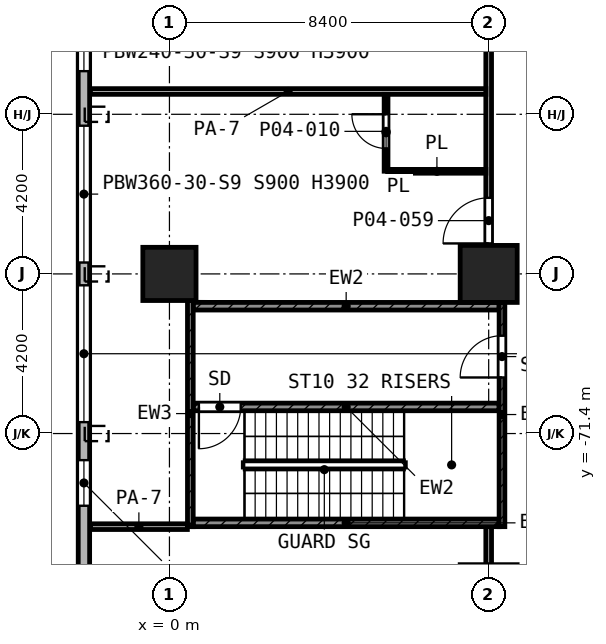
"""IFC4 building model, lengths in metres.
Left out: names, types, materials, properties, quantities, classifications, styles, units other than length and angle.
Written with IfcOpenShell. Run it as: python <this file> out.ifc"""

import sys

from ifc_helpers import new_model, si_unit, direction, frame, frame_2d, origin, origin_2d, place, context, subcontext, project, spatial, rectangle, extrude, element, fill, save


model = new_model("IFC4")
c1 = context("Model", 3, precision=1e-05, world=origin(), true_north=direction((0.0, 1.0)))
c2 = subcontext(c1, "Body", "Model", "MODEL_VIEW")
j1 = project(units=[si_unit("LENGTHUNIT", "METRE"), si_unit("PLANEANGLEUNIT", "RADIAN")], contexts=[c1])
p1 = place(None, origin())
s1 = spatial("IfcSite", under=j1, at=p1, CompositionType="ELEMENT")
p2 = place(p1, origin())
s2 = spatial("IfcBuilding", under=s1, at=p2, CompositionType="ELEMENT")
p3 = place(p2, frame((0.0, 0.0, 18.2)))
s3 = spatial("IfcBuildingStorey", under=s2, at=p3, CompositionType="ELEMENT", Elevation=18.2)
p4 = place(p3, frame((0.0, -67.2, 0.0), z_axis=(0.0, 0.0, 1.0), x_axis=(1.0, 0.0, 0.0)))
e1 = element("IfcColumn", 1, at=p4, inside=s3, PredefinedType="COLUMN", context=c2, shape_type="SweptSolid", body=[
    extrude(rectangle(XDim=1.4, YDim=1.4, at=origin_2d()), origin(), (0.0, 0.0, 1.0), 5.6),
])
p5 = place(p3, frame((8.4, -67.2, 0.0), z_axis=(0.0, 0.0, 1.0), x_axis=(1.0, 0.0, 0.0)))
e2 = element("IfcColumn", 2, at=p5, inside=s3, PredefinedType="COLUMN", context=c2, shape_type="SweptSolid", body=[
    extrude(rectangle(XDim=1.5, YDim=1.5, at=origin_2d()), origin(), (0.0, 0.0, 1.0), 5.6),
])
p6 = place(p3, frame((-2.25, -3.662, 0.0), z_axis=(0.0, 0.0, 1.0), x_axis=(0.0, -1.0, 0.0)))
e3 = element("IfcWall", 3, at=p6, inside=s3, PredefinedType="SOLIDWALL", context=c2, shape_type="SweptSolid", body=[
    extrude(rectangle(XDim=76.676, YDim=0.3, at=frame_2d((38.338, 0.0))), origin(), (0.0, 0.0, 1.0), 5.05),
])
p7 = place(p6, frame((0.838, 0.0, 0.9)))
e4 = element("IfcOpeningElement", 4, at=p7, cuts=e3, PredefinedType="OPENING", context=c2, shape_type="SweptSolid", body=[
    extrude(rectangle(XDim=3.6, YDim=3.0, at=frame_2d((1.8, 1.5))), frame((0.0, 0.16, 0.0), z_axis=(0.0, -1.0, 0.0), x_axis=(1.0, 0.0, 0.0)), (0.0, 0.0, 1.0), 0.32),
])
p8 = place(p6, frame((5.038, 0.0, 0.9)))
e5 = element("IfcOpeningElement", 5, at=p8, cuts=e3, PredefinedType="OPENING", context=c2, shape_type="SweptSolid", body=[
    extrude(rectangle(XDim=3.6, YDim=3.0, at=frame_2d((1.8, 1.5))), frame((0.0, 0.16, 0.0), z_axis=(0.0, -1.0, 0.0), x_axis=(1.0, 0.0, 0.0)), (0.0, 0.0, 1.0), 0.32),
])
p9 = place(p6, frame((9.238, 0.0, 0.9)))
e6 = element("IfcOpeningElement", 6, at=p9, cuts=e3, PredefinedType="OPENING", context=c2, shape_type="SweptSolid", body=[
    extrude(rectangle(XDim=3.6, YDim=3.0, at=frame_2d((1.8, 1.5))), frame((0.0, 0.16, 0.0), z_axis=(0.0, -1.0, 0.0), x_axis=(1.0, 0.0, 0.0)), (0.0, 0.0, 1.0), 0.32),
])
p10 = place(p6, frame((13.438, 0.0, 0.9)))
e7 = element("IfcOpeningElement", 7, at=p10, cuts=e3, PredefinedType="OPENING", context=c2, shape_type="SweptSolid", body=[
    extrude(rectangle(XDim=3.6, YDim=3.0, at=frame_2d((1.8, 1.5))), frame((0.0, 0.16, 0.0), z_axis=(0.0, -1.0, 0.0), x_axis=(1.0, 0.0, 0.0)), (0.0, 0.0, 1.0), 0.32),
])
p11 = place(p6, frame((17.638, 0.0, 0.9)))
e8 = element("IfcOpeningElement", 8, at=p11, cuts=e3, PredefinedType="OPENING", context=c2, shape_type="SweptSolid", body=[
    extrude(rectangle(XDim=3.6, YDim=3.0, at=frame_2d((1.8, 1.5))), frame((0.0, 0.16, 0.0), z_axis=(0.0, -1.0, 0.0), x_axis=(1.0, 0.0, 0.0)), (0.0, 0.0, 1.0), 0.32),
])
p12 = place(p6, frame((21.838, 0.0, 0.9)))
e9 = element("IfcOpeningElement", 9, at=p12, cuts=e3, PredefinedType="OPENING", context=c2, shape_type="SweptSolid", body=[
    extrude(rectangle(XDim=3.6, YDim=3.0, at=frame_2d((1.8, 1.5))), frame((0.0, 0.16, 0.0), z_axis=(0.0, -1.0, 0.0), x_axis=(1.0, 0.0, 0.0)), (0.0, 0.0, 1.0), 0.32),
])
p13 = place(p6, frame((26.038, 0.0, 0.9)))
e10 = element("IfcOpeningElement", 10, at=p13, cuts=e3, PredefinedType="OPENING", context=c2, shape_type="SweptSolid", body=[
    extrude(rectangle(XDim=3.6, YDim=3.0, at=frame_2d((1.8, 1.5))), frame((0.0, 0.16, 0.0), z_axis=(0.0, -1.0, 0.0), x_axis=(1.0, 0.0, 0.0)), (0.0, 0.0, 1.0), 0.32),
])
p14 = place(p6, frame((30.238, 0.0, 0.9)))
e11 = element("IfcOpeningElement", 11, at=p14, cuts=e3, PredefinedType="OPENING", context=c2, shape_type="SweptSolid", body=[
    extrude(rectangle(XDim=3.6, YDim=3.0, at=frame_2d((1.8, 1.5))), frame((0.0, 0.16, 0.0), z_axis=(0.0, -1.0, 0.0), x_axis=(1.0, 0.0, 0.0)), (0.0, 0.0, 1.0), 0.32),
])
p15 = place(p6, frame((34.438, 0.0, 0.9)))
e12 = element("IfcOpeningElement", 12, at=p15, cuts=e3, PredefinedType="OPENING", context=c2, shape_type="SweptSolid", body=[
    extrude(rectangle(XDim=3.6, YDim=3.0, at=frame_2d((1.8, 1.5))), frame((0.0, 0.16, 0.0), z_axis=(0.0, -1.0, 0.0), x_axis=(1.0, 0.0, 0.0)), (0.0, 0.0, 1.0), 0.32),
])
p16 = place(p6, frame((39.288, 0.0, 0.9)))
e13 = element("IfcOpeningElement", 13, at=p16, cuts=e3, PredefinedType="OPENING", context=c2, shape_type="SweptSolid", body=[
    extrude(rectangle(XDim=2.4, YDim=3.0, at=frame_2d((1.2, 1.5))), frame((0.0, 0.16, 0.0), z_axis=(0.0, -1.0, 0.0), x_axis=(1.0, 0.0, 0.0)), (0.0, 0.0, 1.0), 0.32),
])
p17 = place(p6, frame((42.838, 0.0, 0.9)))
e14 = element("IfcOpeningElement", 14, at=p17, cuts=e3, PredefinedType="OPENING", context=c2, shape_type="SweptSolid", body=[
    extrude(rectangle(XDim=3.6, YDim=3.0, at=frame_2d((1.8, 1.5))), frame((0.0, 0.16, 0.0), z_axis=(0.0, -1.0, 0.0), x_axis=(1.0, 0.0, 0.0)), (0.0, 0.0, 1.0), 0.32),
])
p18 = place(p6, frame((47.038, 0.0, 0.9)))
e15 = element("IfcOpeningElement", 15, at=p18, cuts=e3, PredefinedType="OPENING", context=c2, shape_type="SweptSolid", body=[
    extrude(rectangle(XDim=3.6, YDim=3.0, at=frame_2d((1.8, 1.5))), frame((0.0, 0.16, 0.0), z_axis=(0.0, -1.0, 0.0), x_axis=(1.0, 0.0, 0.0)), (0.0, 0.0, 1.0), 0.32),
])
p19 = place(p6, frame((51.238, 0.0, 0.9)))
e16 = element("IfcOpeningElement", 16, at=p19, cuts=e3, PredefinedType="OPENING", context=c2, shape_type="SweptSolid", body=[
    extrude(rectangle(XDim=3.6, YDim=3.0, at=frame_2d((1.8, 1.5))), frame((0.0, 0.16, 0.0), z_axis=(0.0, -1.0, 0.0), x_axis=(1.0, 0.0, 0.0)), (0.0, 0.0, 1.0), 0.32),
])
p20 = place(p6, frame((55.803, 0.0, 0.9)))
e17 = element("IfcOpeningElement", 17, at=p20, cuts=e3, PredefinedType="OPENING", context=c2, shape_type="SweptSolid", body=[
    extrude(rectangle(XDim=2.4, YDim=3.0, at=frame_2d((1.2, 1.5))), frame((0.0, 0.16, 0.0), z_axis=(0.0, -1.0, 0.0), x_axis=(1.0, 0.0, 0.0)), (0.0, 0.0, 1.0), 0.32),
])
p21 = place(p6, frame((59.638, 0.0, 0.9)))
e18 = element("IfcOpeningElement", 18, at=p21, cuts=e3, PredefinedType="OPENING", context=c2, shape_type="SweptSolid", body=[
    extrude(rectangle(XDim=3.6, YDim=3.0, at=frame_2d((1.8, 1.5))), frame((0.0, 0.16, 0.0), z_axis=(0.0, -1.0, 0.0), x_axis=(1.0, 0.0, 0.0)), (0.0, 0.0, 1.0), 0.32),
])
p22 = place(p6, frame((63.838, 0.0, 0.9)))
e19 = element("IfcOpeningElement", 19, at=p22, cuts=e3, PredefinedType="OPENING", context=c2, shape_type="SweptSolid", body=[
    extrude(rectangle(XDim=3.6, YDim=3.0, at=frame_2d((1.8, 1.5))), frame((0.0, 0.16, 0.0), z_axis=(0.0, -1.0, 0.0), x_axis=(1.0, 0.0, 0.0)), (0.0, 0.0, 1.0), 0.32),
])
p23 = place(p6, frame((68.438, 0.0, 0.9)))
e20 = element("IfcOpeningElement", 20, at=p23, cuts=e3, PredefinedType="OPENING", context=c2, shape_type="SweptSolid", body=[
    extrude(rectangle(XDim=1.2, YDim=3.0, at=frame_2d((0.6, 1.5))), frame((0.0, 0.16, 0.0), z_axis=(0.0, -1.0, 0.0), x_axis=(1.0, 0.0, 0.0)), (0.0, 0.0, 1.0), 0.32),
])
p24 = place(p6, frame((72.238, 0.0, 0.9)))
e21 = element("IfcOpeningElement", 21, at=p24, cuts=e3, PredefinedType="OPENING", context=c2, shape_type="SweptSolid", body=[
    extrude(rectangle(XDim=3.6, YDim=3.0, at=frame_2d((1.8, 1.5))), frame((0.0, 0.16, 0.0), z_axis=(0.0, -1.0, 0.0), x_axis=(1.0, 0.0, 0.0)), (0.0, 0.0, 1.0), 0.32),
])
p25 = place(p3, frame((0.55, -73.85, 0.0), z_axis=(0.0, 0.0, 1.0), x_axis=(0.0, 1.0, 0.0)))
e22 = element("IfcWall", 22, at=p25, inside=s3, PredefinedType="SHEAR", context=c2, shape_type="SweptSolid", body=[
    extrude(rectangle(XDim=5.95, YDim=0.15, at=frame_2d((2.975, 0.0))), origin(), (0.0, 0.0, 1.0), 5.05),
])
p26 = place(p3, frame((8.75, -73.85, 0.0), z_axis=(0.0, 0.0, 1.0), x_axis=(0.0, 1.0, 0.0)))
e23 = element("IfcWall", 23, at=p26, inside=s3, PredefinedType="SHEAR", context=c2, shape_type="SweptSolid", body=[
    extrude(rectangle(XDim=5.9, YDim=0.15, at=frame_2d((2.95, 0.0))), origin(), (0.0, 0.0, 1.0), 5.05),
])
p27 = place(p26, frame((3.925, 0.0, 0.0)))
e24 = element("IfcOpeningElement", 24, at=p27, cuts=e23, PredefinedType="OPENING", context=c2, shape_type="SweptSolid", body=[
    extrude(rectangle(XDim=1.1, YDim=2.1, at=frame_2d((0.55, 1.05))), frame((0.0, 0.085, 0.0), z_axis=(0.0, -1.0, 0.0), x_axis=(1.0, 0.0, 0.0)), (0.0, 0.0, 1.0), 0.17),
])
p28 = place(p3, frame((0.625, -73.75, 0.0), z_axis=(0.0, 0.0, 1.0), x_axis=(1.0, 0.0, 0.0)))
e25 = element("IfcWall", 25, at=p28, inside=s3, PredefinedType="SHEAR", context=c2, shape_type="SweptSolid", body=[
    extrude(rectangle(XDim=8.05, YDim=0.2, at=frame_2d((4.025, 0.0))), origin(), (0.0, 0.0, 1.0), 5.05),
])
p29 = place(p3, frame((0.625, -70.7, 0.0), z_axis=(0.0, 0.0, 1.0), x_axis=(1.0, 0.0, 0.0)))
e26 = element("IfcWall", 26, at=p29, inside=s3, PredefinedType="SHEAR", context=c2, shape_type="SweptSolid", body=[
    extrude(rectangle(XDim=8.05, YDim=0.2, at=frame_2d((4.025, 0.0))), origin(), (0.0, 0.0, 1.0), 5.05),
])
p30 = place(p29, frame((0.15, 0.0, 0.0)))
e27 = element("IfcOpeningElement", 27, at=p30, cuts=e26, PredefinedType="OPENING", context=c2, shape_type="SweptSolid", body=[
    extrude(rectangle(XDim=1.1, YDim=2.1, at=frame_2d((0.55, 1.05))), frame((0.0, 0.11, 0.0), z_axis=(0.0, -1.0, 0.0), x_axis=(1.0, 0.0, 0.0)), (0.0, 0.0, 1.0), 0.22),
])
p31 = place(p3, frame((0.625, -68.05, 0.0), z_axis=(0.0, 0.0, 1.0), x_axis=(1.0, 0.0, 0.0)))
e28 = element("IfcWall", 28, at=p31, inside=s3, PredefinedType="SHEAR", context=c2, shape_type="SweptSolid", body=[
    extrude(rectangle(XDim=8.05, YDim=0.2, at=frame_2d((4.025, 0.0))), origin(), (0.0, 0.0, 1.0), 5.05),
])
p32 = place(p3, frame((5.751, -64.5, 0.0), z_axis=(0.0, 0.0, 1.0), x_axis=(1.0, 0.0, 0.0)))
e29 = element("IfcWall", 29, at=p32, inside=s3, PredefinedType="PARTITIONING", context=c2, shape_type="SweptSolid", body=[
    extrude(rectangle(XDim=2.574, YDim=0.1, at=frame_2d((1.287, 0.0))), origin(), (0.0, 0.0, 1.0), 5.05),
])
p33 = place(p3, frame((5.7, -64.498, 0.0), z_axis=(0.0, 0.0, 1.0), x_axis=(0.0, 1.0, 0.0)))
e30 = element("IfcWall", 30, at=p33, inside=s3, PredefinedType="PARTITIONING", context=c2, shape_type="SweptSolid", body=[
    extrude(rectangle(XDim=2.023, YDim=0.1, at=frame_2d((1.011, 0.0))), origin(), (0.0, 0.0, 1.0), 5.05),
])
p34 = place(p33, frame((0.599, 0.0, 0.0)))
e31 = element("IfcOpeningElement", 31, at=p34, cuts=e30, PredefinedType="OPENING", context=c2, shape_type="SweptSolid", body=[
    extrude(rectangle(XDim=0.9, YDim=2.1, at=frame_2d((0.45, 1.05))), frame((0.0, 0.06, 0.0), z_axis=(0.0, -1.0, 0.0), x_axis=(1.0, 0.0, 0.0)), (0.0, 0.0, 1.0), 0.12),
])
p35 = place(p3, frame((-2.08, -73.85, 0.0), z_axis=(0.0, 0.0, 1.0), x_axis=(1.0, 0.0, 0.0)))
e32 = element("IfcWall", 32, at=p35, inside=s3, PredefinedType="PARTITIONING", context=c2, shape_type="SweptSolid", body=[
    extrude(rectangle(XDim=2.552, YDim=0.15, at=frame_2d((1.276, 0.0))), origin(), (0.0, 0.0, 1.0), 3.65),
])
p36 = place(p3, frame((-2.08, -62.4, 0.0), z_axis=(0.0, 0.0, 1.0), x_axis=(1.0, 0.0, 0.0)))
e33 = element("IfcWall", 33, at=p36, inside=s3, PredefinedType="PARTITIONING", context=c2, shape_type="SweptSolid", body=[
    extrude(rectangle(XDim=10.405, YDim=0.15, at=frame_2d((5.203, 0.0))), origin(), (0.0, 0.0, 1.0), 3.65),
])
p37 = place(p3, frame((8.4, -86.08, 0.0), z_axis=(0.0, 0.0, 1.0), x_axis=(0.0, 1.0, 0.0)))
e34 = element("IfcWall", 34, at=p37, inside=s3, PredefinedType="PARTITIONING", context=c2, shape_type="SweptSolid", body=[
    extrude(rectangle(XDim=12.23, YDim=0.15, at=frame_2d((6.115, 0.0))), origin(), (0.0, 0.0, 1.0), 3.65),
])
p38 = place(p37, frame((1.08, 0.0, 0.0)))
e35 = element("IfcOpeningElement", 35, at=p38, cuts=e34, PredefinedType="OPENING", context=c2, shape_type="SweptSolid", body=[
    extrude(rectangle(XDim=1.2, YDim=2.1, at=frame_2d((0.6, 1.05))), frame((0.0, 0.085, 0.0), z_axis=(0.0, -1.0, 0.0), x_axis=(1.0, 0.0, 0.0)), (0.0, 0.0, 1.0), 0.17),
])
p39 = place(p37, frame((3.08, 0.0, 0.0)))
e36 = element("IfcOpeningElement", 36, at=p39, cuts=e34, PredefinedType="OPENING", context=c2, shape_type="SweptSolid", body=[
    extrude(rectangle(XDim=1.2, YDim=2.1, at=frame_2d((0.6, 1.05))), frame((0.0, 0.085, 0.0), z_axis=(0.0, -1.0, 0.0), x_axis=(1.0, 0.0, 0.0)), (0.0, 0.0, 1.0), 0.17),
])
p40 = place(p3, frame((8.4, -67.947, 0.0), z_axis=(0.0, 0.0, 1.0), x_axis=(0.0, 1.0, 0.0)))
e37 = element("IfcWall", 37, at=p40, inside=s3, PredefinedType="PARTITIONING", context=c2, shape_type="SweptSolid", body=[
    extrude(rectangle(XDim=25.597, YDim=0.15, at=frame_2d((12.798, 0.0))), origin(), (0.0, 0.0, 1.0), 5.05),
])
p41 = place(p40, frame((18.347, 0.0, 0.0)))
e38 = element("IfcOpeningElement", 38, at=p41, cuts=e37, PredefinedType="OPENING", context=c2, shape_type="SweptSolid", body=[
    extrude(rectangle(XDim=1.2, YDim=2.1, at=frame_2d((0.6, 1.05))), frame((0.0, 0.085, 0.0), z_axis=(0.0, -1.0, 0.0), x_axis=(1.0, 0.0, 0.0)), (0.0, 0.0, 1.0), 0.17),
])
p42 = place(p40, frame((7.147, 0.0, 0.0)))
e39 = element("IfcOpeningElement", 39, at=p42, cuts=e37, PredefinedType="OPENING", context=c2, shape_type="SweptSolid", body=[
    extrude(rectangle(XDim=1.2, YDim=2.1, at=frame_2d((0.6, 1.05))), frame((0.0, 0.085, 0.0), z_axis=(0.0, -1.0, 0.0), x_axis=(1.0, 0.0, 0.0)), (0.0, 0.0, 1.0), 0.17),
])
p43 = place(p40, frame((9.947, 0.0, 0.0)))
e40 = element("IfcOpeningElement", 40, at=p43, cuts=e37, PredefinedType="OPENING", context=c2, shape_type="SweptSolid", body=[
    extrude(rectangle(XDim=1.2, YDim=2.1, at=frame_2d((0.6, 1.05))), frame((0.0, 0.085, 0.0), z_axis=(0.0, -1.0, 0.0), x_axis=(1.0, 0.0, 0.0)), (0.0, 0.0, 1.0), 0.17),
])
p44 = place(p40, frame((1.549, 0.0, 0.0)))
e41 = element("IfcOpeningElement", 41, at=p44, cuts=e37, PredefinedType="OPENING", context=c2, shape_type="SweptSolid", body=[
    extrude(rectangle(XDim=1.2, YDim=2.1, at=frame_2d((0.6, 1.05))), frame((0.0, 0.085, 0.0), z_axis=(0.0, -1.0, 0.0), x_axis=(1.0, 0.0, 0.0)), (0.0, 0.0, 1.0), 0.17),
])
p45 = place(p20, origin())
e42 = element("IfcWindow", 42, at=p45, inside=s3, PartitioningType="SINGLE_PANEL", PredefinedType="WINDOW", context=c2, shape_type="SweptSolid", body=[
    extrude(rectangle(XDim=2.4, YDim=3.0, at=frame_2d((1.2, 1.5))), frame((0.0, 0.03, 0.0), z_axis=(0.0, -1.0, 0.0), x_axis=(1.0, 0.0, 0.0)), (0.0, 0.0, 1.0), 0.06),
])
fill(e17, e42)
p46 = place(p21, origin())
e43 = element("IfcWindow", 43, at=p46, inside=s3, PartitioningType="SINGLE_PANEL", PredefinedType="WINDOW", context=c2, shape_type="SweptSolid", body=[
    extrude(rectangle(XDim=3.6, YDim=3.0, at=frame_2d((1.8, 1.5))), frame((0.0, 0.03, 0.0), z_axis=(0.0, -1.0, 0.0), x_axis=(1.0, 0.0, 0.0)), (0.0, 0.0, 1.0), 0.06),
])
fill(e18, e43)
p47 = place(p22, origin())
e44 = element("IfcWindow", 44, at=p47, inside=s3, PartitioningType="SINGLE_PANEL", PredefinedType="WINDOW", context=c2, shape_type="SweptSolid", body=[
    extrude(rectangle(XDim=3.6, YDim=3.0, at=frame_2d((1.8, 1.5))), frame((0.0, 0.03, 0.0), z_axis=(0.0, -1.0, 0.0), x_axis=(1.0, 0.0, 0.0)), (0.0, 0.0, 1.0), 0.06),
])
fill(e19, e44)
p48 = place(p23, origin())
e45 = element("IfcWindow", 45, at=p48, inside=s3, PartitioningType="SINGLE_PANEL", PredefinedType="WINDOW", context=c2, shape_type="SweptSolid", body=[
    extrude(rectangle(XDim=1.2, YDim=3.0, at=frame_2d((0.6, 1.5))), frame((0.0, 0.03, 0.0), z_axis=(0.0, -1.0, 0.0), x_axis=(1.0, 0.0, 0.0)), (0.0, 0.0, 1.0), 0.06),
])
fill(e20, e45)
p49 = place(p30, frame((1.1, 0.0, 0.0), z_axis=(0.0, 0.0, 1.0), x_axis=(-1.0, 0.0, 0.0)))
e46 = element("IfcDoor", 46, at=p49, inside=s3, OperationType="SINGLE_SWING_LEFT", PredefinedType="DOOR", context=c2, shape_type="SweptSolid", body=[
    extrude(rectangle(XDim=1.1, YDim=2.1, at=frame_2d((0.55, 1.05))), frame((0.0, 0.025, 0.0), z_axis=(0.0, -1.0, 0.0), x_axis=(1.0, 0.0, 0.0)), (0.0, 0.0, 1.0), 0.05),
])
fill(e27, e46)
p50 = place(p27, origin())
e47 = element("IfcDoor", 47, at=p50, inside=s3, OperationType="SINGLE_SWING_LEFT", PredefinedType="DOOR", context=c2, shape_type="SweptSolid", body=[
    extrude(rectangle(XDim=1.1, YDim=2.1, at=frame_2d((0.55, 1.05))), frame((0.0, 0.025, 0.0), z_axis=(0.0, -1.0, 0.0), x_axis=(1.0, 0.0, 0.0)), (0.0, 0.0, 1.0), 0.05),
])
fill(e24, e47)
p51 = place(p44, origin())
e48 = element("IfcDoor", 48, at=p51, inside=s3, OperationType="SINGLE_SWING_LEFT", PredefinedType="DOOR", context=c2, shape_type="SweptSolid", body=[
    extrude(rectangle(XDim=1.2, YDim=2.1, at=frame_2d((0.6, 1.05))), frame((0.0, 0.025, 0.0), z_axis=(0.0, -1.0, 0.0), x_axis=(1.0, 0.0, 0.0)), (0.0, 0.0, 1.0), 0.05),
])
fill(e41, e48)
p52 = place(p34, origin())
e49 = element("IfcDoor", 49, at=p52, inside=s3, OperationType="SINGLE_SWING_RIGHT", PredefinedType="DOOR", context=c2, shape_type="SweptSolid", body=[
    extrude(rectangle(XDim=0.9, YDim=2.1, at=frame_2d((0.45, 1.05))), frame((0.0, 0.025, 0.0), z_axis=(0.0, -1.0, 0.0), x_axis=(1.0, 0.0, 0.0)), (0.0, 0.0, 1.0), 0.05),
])
fill(e31, e49)
save(model, sys.argv[1])
